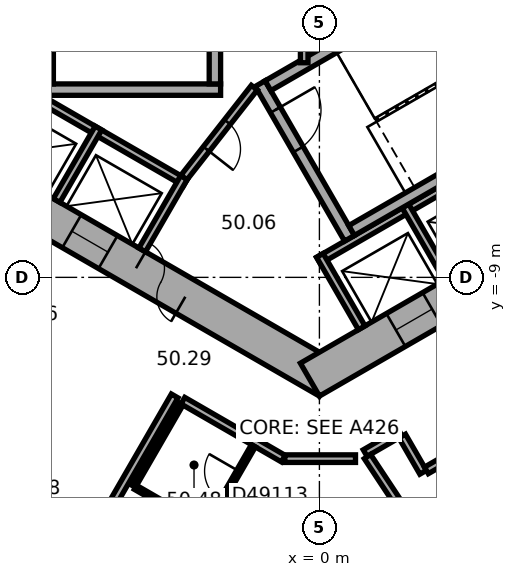
"""IFC4 building model, lengths in metres.
Left out: names, types, materials, properties, quantities, classifications, styles, units other than length and angle.
Written with IfcOpenShell. Run it as: python <this file> out.ifc"""

import sys

from ifc_helpers import new_model, si_unit, direction, frame, frame_2d, origin, place, context, subcontext, project, spatial, rectangle, extrude, element, fill, save


model = new_model("IFC4")
c1 = context("Model", 3, precision=1e-05, world=origin(), true_north=direction((0.0, 1.0)))
c2 = subcontext(c1, "Body", "Model", "MODEL_VIEW")
j1 = project(units=[si_unit("LENGTHUNIT", "METRE"), si_unit("PLANEANGLEUNIT", "RADIAN")], contexts=[c1])
p1 = place(None, origin())
s1 = spatial("IfcSite", under=j1, at=p1, CompositionType="ELEMENT")
p2 = place(p1, origin())
s2 = spatial("IfcBuilding", under=s1, at=p2, CompositionType="ELEMENT")
p3 = place(p2, frame((0.0, 0.0, 202.1)))
s3 = spatial("IfcBuildingStorey", under=s2, at=p3, CompositionType="ELEMENT", Elevation=202.1)
p4 = place(p3, frame((-10.25, -5.629, 0.0), z_axis=(0.0, 0.0, 1.0), x_axis=(0.866022616891, -0.50000482701, 0.0)))
e1 = element("IfcWall", 1, at=p4, inside=s3, PredefinedType="SHEAR", context=c2, shape_type="SweptSolid", body=[
    extrude(rectangle(XDim=12.125, YDim=1.0, at=frame_2d((6.062, 0.0))), origin(), (0.0, 0.0, 1.0), 3.7),
])
p5 = place(p4, frame((6.262, 0.0, 0.0)))
e2 = element("IfcOpeningElement", 2, at=p5, cuts=e1, PredefinedType="OPENING", context=c2, shape_type="SweptSolid", body=[
    extrude(rectangle(XDim=1.5, YDim=2.1, at=frame_2d((0.75, 1.05))), frame((0.0, 0.51, 0.0), z_axis=(0.0, -1.0, 0.0), x_axis=(1.0, 0.0, 0.0)), (0.0, 0.0, 1.0), 1.02),
])
p6 = place(p4, frame((1.712, 0.0, 0.0)))
e3 = element("IfcOpeningElement", 3, at=p6, cuts=e1, PredefinedType="OPENING", context=c2, shape_type="SweptSolid", body=[
    extrude(rectangle(XDim=1.1, YDim=2.1, at=frame_2d((0.55, 1.05))), frame((0.0, 0.51, 0.0), z_axis=(0.0, -1.0, 0.0), x_axis=(1.0, 0.0, 0.0)), (0.0, 0.0, 1.0), 1.02),
])
p7 = place(p4, frame((4.312, 0.0, 0.0)))
e4 = element("IfcOpeningElement", 4, at=p7, cuts=e1, PredefinedType="OPENING", context=c2, shape_type="SweptSolid", body=[
    extrude(rectangle(XDim=1.1, YDim=2.1, at=frame_2d((0.55, 1.05))), frame((0.0, 0.51, 0.0), z_axis=(0.0, -1.0, 0.0), x_axis=(1.0, 0.0, 0.0)), (0.0, 0.0, 1.0), 1.02),
])
p8 = place(p3, frame((-0.25, -11.691, 0.0), z_axis=(0.0, 0.0, 1.0), x_axis=(0.866022616891, 0.50000482701, 0.0)))
e5 = element("IfcWall", 5, at=p8, inside=s3, PredefinedType="SHEAR", context=c2, shape_type="SweptSolid", body=[
    extrude(rectangle(XDim=12.125, YDim=1.0, at=frame_2d((6.062, 0.0))), origin(), (0.0, 0.0, 1.0), 3.7),
])
p9 = place(p8, frame((2.612, 0.0, 0.0)))
e6 = element("IfcOpeningElement", 6, at=p9, cuts=e5, PredefinedType="OPENING", context=c2, shape_type="SweptSolid", body=[
    extrude(rectangle(XDim=1.1, YDim=2.1, at=frame_2d((0.55, 1.05))), frame((0.0, 0.51, 0.0), z_axis=(0.0, -1.0, 0.0), x_axis=(1.0, 0.0, 0.0)), (0.0, 0.0, 1.0), 1.02),
])
p10 = place(p8, frame((5.212, 0.0, 0.0)))
e7 = element("IfcOpeningElement", 7, at=p10, cuts=e5, PredefinedType="OPENING", context=c2, shape_type="SweptSolid", body=[
    extrude(rectangle(XDim=1.1, YDim=2.1, at=frame_2d((0.55, 1.05))), frame((0.0, 0.51, 0.0), z_axis=(0.0, -1.0, 0.0), x_axis=(1.0, 0.0, 0.0)), (0.0, 0.0, 1.0), 1.02),
])
p11 = place(p8, frame((7.812, 0.0, 0.0)))
e8 = element("IfcOpeningElement", 8, at=p11, cuts=e5, PredefinedType="OPENING", context=c2, shape_type="SweptSolid", body=[
    extrude(rectangle(XDim=1.1, YDim=2.1, at=frame_2d((0.55, 1.05))), frame((0.0, 0.51, 0.0), z_axis=(0.0, -1.0, 0.0), x_axis=(1.0, 0.0, 0.0)), (0.0, 0.0, 1.0), 1.02),
])
p12 = place(p3, frame((-18.789, -14.267, 0.0), z_axis=(0.0, 0.0, 1.0), x_axis=(0.866023315909, -0.500003616288, 0.0)))
e9 = element("IfcWall", 9, at=p12, inside=s3, PredefinedType="STANDARD", context=c2, shape_type="SweptSolid", body=[
    extrude(rectangle(XDim=20.044, YDim=0.2, at=frame_2d((10.022, 0.0))), origin(), (0.0, 0.0, 1.0), 3.7),
])
p13 = place(p12, frame((1.314, 0.0, 0.9)))
e10 = element("IfcOpeningElement", 10, at=p13, cuts=e9, PredefinedType="OPENING", context=c2, shape_type="SweptSolid", body=[
    extrude(rectangle(XDim=2.4, YDim=2.0, at=frame_2d((1.2, 1.0))), frame((0.0, 0.11, 0.0), z_axis=(0.0, -1.0, 0.0), x_axis=(1.0, 0.0, 0.0)), (0.0, 0.0, 1.0), 0.22),
])
p14 = place(p12, frame((5.069, 0.0, 0.9)))
e11 = element("IfcOpeningElement", 11, at=p14, cuts=e9, PredefinedType="OPENING", context=c2, shape_type="SweptSolid", body=[
    extrude(rectangle(XDim=2.4, YDim=2.0, at=frame_2d((1.2, 1.0))), frame((0.0, 0.11, 0.0), z_axis=(0.0, -1.0, 0.0), x_axis=(1.0, 0.0, 0.0)), (0.0, 0.0, 1.0), 0.22),
])
p15 = place(p12, frame((8.823, 0.0, 0.9)))
e12 = element("IfcOpeningElement", 12, at=p15, cuts=e9, PredefinedType="OPENING", context=c2, shape_type="SweptSolid", body=[
    extrude(rectangle(XDim=2.4, YDim=2.0, at=frame_2d((1.2, 1.0))), frame((0.0, 0.11, 0.0), z_axis=(0.0, -1.0, 0.0), x_axis=(1.0, 0.0, 0.0)), (0.0, 0.0, 1.0), 0.22),
])
p16 = place(p12, frame((12.577, 0.0, 0.9)))
e13 = element("IfcOpeningElement", 13, at=p16, cuts=e9, PredefinedType="OPENING", context=c2, shape_type="SweptSolid", body=[
    extrude(rectangle(XDim=2.4, YDim=2.0, at=frame_2d((1.2, 1.0))), frame((0.0, 0.11, 0.0), z_axis=(0.0, -1.0, 0.0), x_axis=(1.0, 0.0, 0.0)), (0.0, 0.0, 1.0), 0.22),
])
p17 = place(p12, frame((16.331, 0.0, 0.9)))
e14 = element("IfcOpeningElement", 14, at=p17, cuts=e9, PredefinedType="OPENING", context=c2, shape_type="SweptSolid", body=[
    extrude(rectangle(XDim=2.4, YDim=2.0, at=frame_2d((1.2, 1.0))), frame((0.0, 0.11, 0.0), z_axis=(0.0, -1.0, 0.0), x_axis=(1.0, 0.0, 0.0)), (0.0, 0.0, 1.0), 0.22),
])
p18 = place(p3, frame((2.911, -24.156, 0.0), z_axis=(0.0, 0.0, 1.0), x_axis=(0.833882163564, 0.551942512668, 0.0)))
e15 = element("IfcWall", 15, at=p18, inside=s3, PredefinedType="STANDARD", context=c2, shape_type="SweptSolid", body=[
    extrude(rectangle(XDim=20.044, YDim=0.2, at=frame_2d((10.022, 0.0))), origin(), (0.0, 0.0, 1.0), 3.7),
])
p19 = place(p18, frame((1.313, 0.0, 0.9)))
e16 = element("IfcOpeningElement", 16, at=p19, cuts=e15, PredefinedType="OPENING", context=c2, shape_type="SweptSolid", body=[
    extrude(rectangle(XDim=2.4, YDim=2.0, at=frame_2d((1.2, 1.0))), frame((0.0, 0.11, 0.0), z_axis=(0.0, -1.0, 0.0), x_axis=(1.0, 0.0, 0.0)), (0.0, 0.0, 1.0), 0.22),
])
p20 = place(p18, frame((5.067, 0.0, 0.9)))
e17 = element("IfcOpeningElement", 17, at=p20, cuts=e15, PredefinedType="OPENING", context=c2, shape_type="SweptSolid", body=[
    extrude(rectangle(XDim=2.4, YDim=2.0, at=frame_2d((1.2, 1.0))), frame((0.0, 0.11, 0.0), z_axis=(0.0, -1.0, 0.0), x_axis=(1.0, 0.0, 0.0)), (0.0, 0.0, 1.0), 0.22),
])
p21 = place(p18, frame((8.821, 0.0, 0.9)))
e18 = element("IfcOpeningElement", 18, at=p21, cuts=e15, PredefinedType="OPENING", context=c2, shape_type="SweptSolid", body=[
    extrude(rectangle(XDim=2.4, YDim=2.0, at=frame_2d((1.2, 1.0))), frame((0.0, 0.11, 0.0), z_axis=(0.0, -1.0, 0.0), x_axis=(1.0, 0.0, 0.0)), (0.0, 0.0, 1.0), 0.22),
])
p22 = place(p18, frame((12.575, 0.0, 0.9)))
e19 = element("IfcOpeningElement", 19, at=p22, cuts=e15, PredefinedType="OPENING", context=c2, shape_type="SweptSolid", body=[
    extrude(rectangle(XDim=2.4, YDim=2.0, at=frame_2d((1.2, 1.0))), frame((0.0, 0.11, 0.0), z_axis=(0.0, -1.0, 0.0), x_axis=(1.0, 0.0, 0.0)), (0.0, 0.0, 1.0), 0.22),
])
p23 = place(p18, frame((16.329, 0.0, 0.9)))
e20 = element("IfcOpeningElement", 20, at=p23, cuts=e15, PredefinedType="OPENING", context=c2, shape_type="SweptSolid", body=[
    extrude(rectangle(XDim=2.4, YDim=2.0, at=frame_2d((1.2, 1.0))), frame((0.0, 0.11, 0.0), z_axis=(0.0, -1.0, 0.0), x_axis=(1.0, 0.0, 0.0)), (0.0, 0.0, 1.0), 0.22),
])
p24 = place(p3, frame((-8.203, -3.809, 0.0), z_axis=(0.0, 0.0, 1.0), x_axis=(0.866028230842, -0.499995103361, 0.0)))
e21 = element("IfcWall", 21, at=p24, inside=s3, PredefinedType="PARTITIONING", context=c2, shape_type="SweptSolid", body=[
    extrude(rectangle(XDim=5.4, YDim=0.2, at=frame_2d((2.7, 0.0))), origin(), (0.0, 0.0, 1.0), 3.35),
])
p25 = place(p3, frame((-5.815, -5.072, 0.0), z_axis=(0.0, 0.0, 1.0), x_axis=(-0.499946605688, -0.86605622881, 0.0)))
e22 = element("IfcWall", 22, at=p25, inside=s3, PredefinedType="PARTITIONING", context=c2, shape_type="SweptSolid", body=[
    extrude(rectangle(XDim=2.2, YDim=0.2, at=frame_2d((1.1, 0.0))), origin(), (0.0, 0.0, 1.0), 3.35),
])
p26 = place(p3, frame((-3.563, -6.372, 0.0), z_axis=(0.0, 0.0, 1.0), x_axis=(-0.499994660107, -0.866028486751, 0.0)))
e23 = element("IfcWall", 23, at=p26, inside=s3, PredefinedType="PARTITIONING", context=c2, shape_type="SweptSolid", body=[
    extrude(rectangle(XDim=2.2, YDim=0.2, at=frame_2d((1.1, 0.0))), origin(), (0.0, 0.0, 1.0), 3.35),
])
p27 = place(p3, frame((-0.024, -8.559, 0.0), z_axis=(0.0, 0.0, 1.0), x_axis=(0.866026010844, 0.49999894854, 0.0)))
e24 = element("IfcWall", 24, at=p27, inside=s3, PredefinedType="PARTITIONING", context=c2, shape_type="SweptSolid", body=[
    extrude(rectangle(XDim=8.0, YDim=0.2, at=frame_2d((4.0, 0.0))), origin(), (0.0, 0.0, 1.0), 3.35),
])
for number, where, z_axis, x_axis in (
    (25, (0.013, -8.422, 0.0), (0.0, 0.0, 1.0), (0.5, -0.866, 0.0)),
    (26, (2.264, -7.122, 0.0), (0.0, 0.0, 1.0), (0.5, -0.866, 0.0)),
):
    element("IfcWall", number, at=place(p3, frame(where, z_axis=z_axis, x_axis=x_axis)), inside=s3, PredefinedType="PARTITIONING", context=c2, shape_type="SweptSolid", body=[
        extrude(rectangle(XDim=2.2, YDim=0.2, at=frame_2d((1.1, 0.0))), origin(), (0.0, 0.0, 1.0), 3.35),
    ])
p28 = place(p3, frame((-2.6, -4.06, 0.0), z_axis=(0.0, 0.0, 1.0), x_axis=(-1.0, 0.0, 0.0)))
e27 = element("IfcWall", 27, at=p28, inside=s3, PredefinedType="SHEAR", context=c2, shape_type="SweptSolid", body=[
    extrude(rectangle(XDim=4.7, YDim=0.3, at=frame_2d((2.35, 0.0))), origin(), (0.0, 0.0, 1.0), 3.35),
])
for number, where, z_axis, x_axis in (
    (28, (-2.75, 3.15, 0.0), (0.0, 0.0, 1.0), (0.0, -1.0, 0.0)),
    (29, (-7.15, 3.15, 0.0), (0.0, 0.0, 1.0), (0.0, -1.0, 0.0)),
):
    element("IfcWall", number, at=place(p3, frame(where, z_axis=z_axis, x_axis=x_axis)), inside=s3, PredefinedType="SHEAR", context=c2, shape_type="SweptSolid", body=[
        extrude(rectangle(XDim=7.06, YDim=0.3, at=frame_2d((3.53, 0.0))), origin(), (0.0, 0.0, 1.0), 3.35),
    ])
p29 = place(p3, frame((-1.558, -3.902, 0.0), z_axis=(0.0, 0.0, 1.0), x_axis=(0.499977259774, -0.866038532462, 0.0)))
e30 = element("IfcWall", 30, at=p29, inside=s3, PredefinedType="SHEAR", context=c2, shape_type="SweptSolid", body=[
    extrude(rectangle(XDim=4.7, YDim=0.3, at=frame_2d((2.35, 0.0))), origin(), (0.0, 0.0, 1.0), 3.35),
])
p30 = place(p29, frame((0.8, 0.0, 0.0)))
e31 = element("IfcOpeningElement", 31, at=p30, cuts=e30, PredefinedType="OPENING", context=c2, shape_type="SweptSolid", body=[
    extrude(rectangle(XDim=1.2, YDim=2.1, at=frame_2d((0.6, 1.05))), frame((0.0, 0.16, 0.0), z_axis=(0.0, -1.0, 0.0), x_axis=(1.0, 0.0, 0.0)), (0.0, 0.0, 1.0), 0.32),
])
for number, where, z_axis, x_axis in (
    (32, (-1.353, -3.957, 0.0), (0.0, 0.0, 1.0), (0.866, 0.5, 0.0)),
    (33, (0.847, -7.767, 0.0), (0.0, 0.0, 1.0), (0.866, 0.5, 0.0)),
):
    element("IfcWall", number, at=place(p3, frame(where, z_axis=z_axis, x_axis=x_axis)), inside=s3, PredefinedType="SHEAR", context=c2, shape_type="SweptSolid", body=[
        extrude(rectangle(XDim=7.06, YDim=0.3, at=frame_2d((3.53, 0.0))), origin(), (0.0, 0.0, 1.0), 3.35),
    ])
p31 = place(p3, frame((-1.712, -4.008, 0.0), z_axis=(0.0, 0.0, 1.0), x_axis=(-0.616549420702, -0.787316208287, 0.0)))
e34 = element("IfcWall", 34, at=p31, inside=s3, PredefinedType="PARTITIONING", context=c2, shape_type="SweptSolid", body=[
    extrude(rectangle(XDim=3.002, YDim=0.2, at=frame_2d((1.501, 0.0))), origin(), (0.0, 0.0, 1.0), 3.35),
])
p32 = place(p31, frame((1.15, 0.0, 0.0)))
e35 = element("IfcOpeningElement", 35, at=p32, cuts=e34, PredefinedType="OPENING", context=c2, shape_type="SweptSolid", body=[
    extrude(rectangle(XDim=0.9, YDim=2.1, at=frame_2d((0.45, 1.05))), frame((0.0, 0.11, 0.0), z_axis=(0.0, -1.0, 0.0), x_axis=(1.0, 0.0, 0.0)), (0.0, 0.0, 1.0), 0.22),
])
p33 = place(p3, frame((-0.4, -3.353, 0.0), z_axis=(0.0, 0.0, 1.0), x_axis=(0.0, 1.0, 0.0)))
e36 = element("IfcWall", 36, at=p33, inside=s3, PredefinedType="PARTITIONING", context=c2, shape_type="SweptSolid", body=[
    extrude(rectangle(XDim=6.707, YDim=0.2, at=frame_2d((3.353, 0.0))), origin(), (0.0, 0.0, 1.0), 3.35),
])
p34 = place(p3, frame((-7.984, -19.351, 0.0), z_axis=(0.0, 0.0, 1.0), x_axis=(0.500010139422, 0.866019549707, 0.0)))
e37 = element("IfcWall", 37, at=p34, inside=s3, PredefinedType="PARTITIONING", context=c2, shape_type="SweptSolid", body=[
    extrude(rectangle(XDim=8.35, YDim=0.2, at=frame_2d((4.175, 0.0))), origin(), (0.0, 0.0, 1.0), 3.35),
])
p35 = place(p34, frame((3.675, 0.0, 0.0)))
e38 = element("IfcOpeningElement", 38, at=p35, cuts=e37, PredefinedType="OPENING", context=c2, shape_type="SweptSolid", body=[
    extrude(rectangle(XDim=1.0, YDim=2.1, at=frame_2d((0.5, 1.05))), frame((0.0, 0.11, 0.0), z_axis=(0.0, -1.0, 0.0), x_axis=(1.0, 0.0, 0.0)), (0.0, 0.0, 1.0), 0.22),
])
p36 = place(p3, frame((-4.892, -14.496, 0.0), z_axis=(0.0, 0.0, 1.0), x_axis=(0.500004234368, 0.866022959057, 0.0)))
e39 = element("IfcWall", 39, at=p36, inside=s3, PredefinedType="PARTITIONING", context=c2, shape_type="SweptSolid", body=[
    extrude(rectangle(XDim=2.5, YDim=0.12, at=frame_2d((1.25, 0.0))), origin(), (0.0, 0.0, 1.0), 3.35),
])
p37 = place(p3, frame((-3.592, -12.244, 0.0), z_axis=(0.0, 0.0, 1.0), x_axis=(0.866028335764, -0.499994921628, 0.0)))
e40 = element("IfcWall", 40, at=p37, inside=s3, PredefinedType="PARTITIONING", context=c2, shape_type="SweptSolid", body=[
    extrude(rectangle(XDim=3.051, YDim=0.2, at=frame_2d((1.525, 0.0))), origin(), (0.0, 0.0, 1.0), 3.35),
])
p38 = place(p3, frame((-2.987, -15.596, 0.0), z_axis=(0.0, 0.0, 1.0), x_axis=(-0.86600889856, 0.500028586798, 0.0)))
e41 = element("IfcWall", 41, at=p38, inside=s3, PredefinedType="PARTITIONING", context=c2, shape_type="SweptSolid", body=[
    extrude(rectangle(XDim=2.14, YDim=0.12, at=frame_2d((1.07, 0.0))), origin(), (0.0, 0.0, 1.0), 3.35),
])
p39 = place(p3, frame((-1.737, -13.431, 0.0), z_axis=(0.0, 0.0, 1.0), x_axis=(-0.499959183527, -0.866048967903, 0.0)))
e42 = element("IfcWall", 42, at=p39, inside=s3, PredefinedType="PARTITIONING", context=c2, shape_type="SweptSolid", body=[
    extrude(rectangle(XDim=2.44, YDim=0.12, at=frame_2d((1.22, 0.0))), origin(), (0.0, 0.0, 1.0), 3.35),
])
p40 = place(p39, frame((0.77, 0.0, 0.0)))
e43 = element("IfcOpeningElement", 43, at=p40, cuts=e42, PredefinedType="OPENING", context=c2, shape_type="SweptSolid", body=[
    extrude(rectangle(XDim=0.9, YDim=2.1, at=frame_2d((0.45, 1.05))), frame((0.0, 0.07, 0.0), z_axis=(0.0, -1.0, 0.0), x_axis=(1.0, 0.0, 0.0)), (0.0, 0.0, 1.0), 0.14),
])
p41 = place(p3, frame((-0.91, -13.77, 0.0), z_axis=(0.0, 0.0, 1.0), x_axis=(1.0, 0.0, 0.0)))
e44 = element("IfcWall", 44, at=p41, inside=s3, PredefinedType="PARTITIONING", context=c2, shape_type="SweptSolid", body=[
    extrude(rectangle(XDim=1.86, YDim=0.2, at=frame_2d((0.93, 0.0))), origin(), (0.0, 0.0, 1.0), 3.35),
])
p42 = place(p3, frame((1.204, -13.623, 0.0), z_axis=(0.0, 0.0, 1.0), x_axis=(0.866040989419, 0.499973003918, 0.0)))
e45 = element("IfcWall", 45, at=p42, inside=s3, PredefinedType="PARTITIONING", context=c2, shape_type="SweptSolid", body=[
    extrude(rectangle(XDim=1.068, YDim=0.2, at=frame_2d((0.534, 0.0))), origin(), (0.0, 0.0, 1.0), 3.35),
])
p43 = place(p3, frame((2.179, -13.176, 0.0), z_axis=(0.0, 0.0, 1.0), x_axis=(0.499978356969, -0.866037899034, 0.0)))
e46 = element("IfcWall", 46, at=p43, inside=s3, PredefinedType="PARTITIONING", context=c2, shape_type="SweptSolid", body=[
    extrude(rectangle(XDim=1.101, YDim=0.2, at=frame_2d((0.551, 0.0))), origin(), (0.0, 0.0, 1.0), 3.35),
])
p44 = place(p3, frame((2.816, -14.079, 0.0), z_axis=(0.0, 0.0, 1.0), x_axis=(0.866021128829, 0.500007404367, 0.0)))
e47 = element("IfcWall", 47, at=p44, inside=s3, PredefinedType="PARTITIONING", context=c2, shape_type="SweptSolid", body=[
    extrude(rectangle(XDim=8.702, YDim=0.2, at=frame_2d((4.351, 0.0))), origin(), (0.0, 0.0, 1.0), 3.35),
])
p45 = place(p44, frame((2.714, 0.0, 0.0)))
e48 = element("IfcOpeningElement", 48, at=p45, cuts=e47, PredefinedType="OPENING", context=c2, shape_type="SweptSolid", body=[
    extrude(rectangle(XDim=1.0, YDim=2.1, at=frame_2d((0.5, 1.05))), frame((0.0, 0.11, 0.0), z_axis=(0.0, -1.0, 0.0), x_axis=(1.0, 0.0, 0.0)), (0.0, 0.0, 1.0), 0.22),
])
p46 = place(p3, frame((3.005, -16.164, 0.0), z_axis=(0.0, 0.0, 1.0), x_axis=(0.866018452427, 0.500012039911, 0.0)))
e49 = element("IfcWall", 49, at=p46, inside=s3, PredefinedType="PARTITIONING", context=c2, shape_type="SweptSolid", body=[
    extrude(rectangle(XDim=7.322, YDim=0.12, at=frame_2d((3.661, 0.0))), origin(), (0.0, 0.0, 1.0), 3.35),
])
p47 = place(p46, frame((0.55, 0.0, 0.0)))
e50 = element("IfcOpeningElement", 50, at=p47, cuts=e49, PredefinedType="OPENING", context=c2, shape_type="SweptSolid", body=[
    extrude(rectangle(XDim=1.0, YDim=2.1, at=frame_2d((0.5, 1.05))), frame((0.0, 0.07, 0.0), z_axis=(0.0, -1.0, 0.0), x_axis=(1.0, 0.0, 0.0)), (0.0, 0.0, 1.0), 0.14),
])
p48 = place(p46, frame((2.736, 0.0, 0.0)))
e51 = element("IfcOpeningElement", 51, at=p48, cuts=e49, PredefinedType="OPENING", context=c2, shape_type="SweptSolid", body=[
    extrude(rectangle(XDim=0.9, YDim=2.1, at=frame_2d((0.45, 1.05))), frame((0.0, 0.07, 0.0), z_axis=(0.0, -1.0, 0.0), x_axis=(1.0, 0.0, 0.0)), (0.0, 0.0, 1.0), 0.14),
])
p49 = place(p46, frame((5.347, 0.0, 0.0)))
e52 = element("IfcOpeningElement", 52, at=p49, cuts=e49, PredefinedType="OPENING", context=c2, shape_type="SweptSolid", body=[
    extrude(rectangle(XDim=0.9, YDim=2.1, at=frame_2d((0.45, 1.05))), frame((0.0, 0.07, 0.0), z_axis=(0.0, -1.0, 0.0), x_axis=(1.0, 0.0, 0.0)), (0.0, 0.0, 1.0), 0.14),
])
p50 = place(p3, frame((6.02, -20.899, 0.0), z_axis=(0.0, 0.0, 1.0), x_axis=(-0.551943990108, 0.833881185651, 0.0)))
e53 = element("IfcWall", 53, at=p50, inside=s3, PredefinedType="PARTITIONING", context=c2, shape_type="SweptSolid", body=[
    extrude(rectangle(XDim=8.615, YDim=0.2, at=frame_2d((4.308, 0.0))), origin(), (0.0, 0.0, 1.0), 3.35),
])
p51 = place(p5, origin())
e54 = element("IfcDoor", 54, at=p51, inside=s3, OperationType="DOUBLE_DOOR_SINGLE_SWING", PredefinedType="DOOR", context=c2, shape_type="SweptSolid", body=[
    extrude(rectangle(XDim=1.5, YDim=2.1, at=frame_2d((0.75, 1.05))), frame((0.0, 0.025, 0.0), z_axis=(0.0, -1.0, 0.0), x_axis=(1.0, 0.0, 0.0)), (0.0, 0.0, 1.0), 0.05),
])
fill(e2, e54)
p52 = place(p30, origin())
e55 = element("IfcDoor", 55, at=p52, inside=s3, OperationType="SINGLE_SWING_RIGHT", PredefinedType="DOOR", context=c2, shape_type="SweptSolid", body=[
    extrude(rectangle(XDim=1.2, YDim=2.1, at=frame_2d((0.6, 1.05))), frame((0.0, 0.025, 0.0), z_axis=(0.0, -1.0, 0.0), x_axis=(1.0, 0.0, 0.0)), (0.0, 0.0, 1.0), 0.05),
])
fill(e31, e55)
p53 = place(p32, origin())
e56 = element("IfcDoor", 56, at=p53, inside=s3, OperationType="SINGLE_SWING_LEFT", PredefinedType="DOOR", context=c2, shape_type="SweptSolid", body=[
    extrude(rectangle(XDim=0.9, YDim=2.1, at=frame_2d((0.45, 1.05))), frame((0.0, 0.025, 0.0), z_axis=(0.0, -1.0, 0.0), x_axis=(1.0, 0.0, 0.0)), (0.0, 0.0, 1.0), 0.05),
])
fill(e35, e56)
p54 = place(p7, origin())
e57 = element("IfcDoor", 57, at=p54, inside=s3, OperationType="DOUBLE_DOOR_SLIDING", PredefinedType="DOOR", context=c2, shape_type="SweptSolid", body=[
    extrude(rectangle(XDim=1.1, YDim=2.1, at=frame_2d((0.55, 1.05))), frame((0.0, 0.025, 0.0), z_axis=(0.0, -1.0, 0.0), x_axis=(1.0, 0.0, 0.0)), (0.0, 0.0, 1.0), 0.05),
])
fill(e4, e57)
p55 = place(p9, origin())
e58 = element("IfcDoor", 58, at=p55, inside=s3, OperationType="DOUBLE_DOOR_SLIDING", PredefinedType="DOOR", context=c2, shape_type="SweptSolid", body=[
    extrude(rectangle(XDim=1.1, YDim=2.1, at=frame_2d((0.55, 1.05))), frame((0.0, 0.025, 0.0), z_axis=(0.0, -1.0, 0.0), x_axis=(1.0, 0.0, 0.0)), (0.0, 0.0, 1.0), 0.05),
])
fill(e6, e58)
p56 = place(p40, origin())
e59 = element("IfcDoor", 59, at=p56, inside=s3, OperationType="SINGLE_SWING_LEFT", PredefinedType="DOOR", context=c2, shape_type="SweptSolid", body=[
    extrude(rectangle(XDim=0.9, YDim=2.1, at=frame_2d((0.45, 1.05))), frame((0.0, 0.025, 0.0), z_axis=(0.0, -1.0, 0.0), x_axis=(1.0, 0.0, 0.0)), (0.0, 0.0, 1.0), 0.05),
])
fill(e43, e59)
save(model, sys.argv[1])
